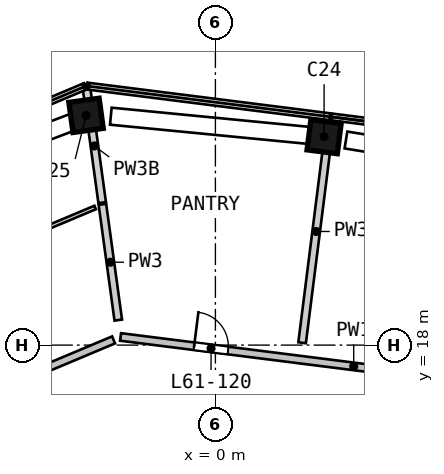
"""IFC4 building model, lengths in metres.
Left out: names, types, materials, properties, quantities, classifications, styles, units other than length and angle.
Written with IfcOpenShell. Run it as: python <this file> out.ifc"""

import sys

from ifc_helpers import new_model, si_unit, direction, frame, frame_2d, origin, origin_2d, place, context, subcontext, project, spatial, rectangle, extrude, element, fill, save


model = new_model("IFC4")
c1 = context("Model", 3, precision=1e-05, world=origin(), true_north=direction((0.0, 1.0)))
c2 = subcontext(c1, "Body", "Model", "MODEL_VIEW")
j1 = project(units=[si_unit("LENGTHUNIT", "METRE"), si_unit("PLANEANGLEUNIT", "RADIAN")], contexts=[c1])
p1 = place(None, origin())
s1 = spatial("IfcSite", under=j1, at=p1, CompositionType="ELEMENT")
p2 = place(p1, origin())
s2 = spatial("IfcBuilding", under=s1, at=p2, CompositionType="ELEMENT")
p3 = place(p2, frame((0.0, 0.0, 248.0)))
s3 = spatial("IfcBuildingStorey", under=s2, at=p3, CompositionType="ELEMENT", Elevation=248.0)
p4 = place(p3, frame((2.965, 23.472, 0.0), z_axis=(-0.087123468, 0.01027372, 0.996144544), x_axis=(-0.988270066, 0.125007093, -0.08772402)))
e1 = element("IfcColumn", 1, at=p4, inside=s3, PredefinedType="COLUMN", context=c2, shape_type="SweptSolid", body=[
    extrude(rectangle(XDim=0.8, YDim=0.8, at=origin_2d()), origin(), (0.0, 0.0, 1.0), 4.206),
])
p5 = place(p3, frame((-3.296, 24.061, 0.0), z_axis=(-0.089136206, -0.01299903, 0.995934617), x_axis=(0.986689244, 0.13539081, 0.090075878)))
e2 = element("IfcColumn", 2, at=p5, inside=s3, PredefinedType="COLUMN", context=c2, shape_type="SweptSolid", body=[
    extrude(rectangle(XDim=0.8, YDim=0.8, at=origin_2d()), origin(), (0.0, 0.0, 1.0), 4.207),
])
p6 = place(p3, frame((-11.268, 14.527, 0.0), z_axis=(0.0, 0.0, 1.0), x_axis=(0.921862121, 0.387518038, 0.0)))
e3 = element("IfcWall", 3, at=p6, inside=s3, PredefinedType="SOLIDWALL", context=c2, shape_type="SweptSolid", body=[
    extrude(rectangle(XDim=9.317, YDim=0.2, at=frame_2d((4.658, 0.0))), origin(), (0.0, 0.0, 1.0), 4.19),
])
p7 = place(p6, frame((5.15, 0.0, 0.0)))
e4 = element("IfcOpeningElement", 4, at=p7, cuts=e3, PredefinedType="OPENING", context=c2, shape_type="SweptSolid", body=[
    extrude(rectangle(XDim=1.0, YDim=2.1, at=frame_2d((0.5, 1.05))), frame((0.0, 0.11, 0.0), z_axis=(0.0, -1.0, 0.0), x_axis=(1.0, 0.0, 0.0)), (0.0, 0.0, 1.0), 0.22),
])
p8 = place(p3, frame((-2.495, 18.215, 0.0), z_axis=(0.0, 0.0, 1.0), x_axis=(0.992116583, -0.125318334, 0.0)))
e5 = element("IfcWall", 5, at=p8, inside=s3, PredefinedType="SOLIDWALL", context=c2, shape_type="SweptSolid", body=[
    extrude(rectangle(XDim=9.316, YDim=0.2, at=frame_2d((4.658, 0.0))), origin(), (0.0, 0.0, 1.0), 4.19),
])
p9 = place(p8, frame((1.95, 0.0, 0.0)))
e6 = element("IfcOpeningElement", 6, at=p9, cuts=e5, PredefinedType="OPENING", context=c2, shape_type="SweptSolid", body=[
    extrude(rectangle(XDim=0.9, YDim=2.1, at=frame_2d((0.45, 1.05))), frame((0.0, 0.11, 0.0), z_axis=(0.0, -1.0, 0.0), x_axis=(1.0, 0.0, 0.0)), (0.0, 0.0, 1.0), 0.22),
])
p10 = place(p3, frame((-6.578, 20.187, 0.0), z_axis=(0.0, 0.0, 1.0), x_axis=(0.921857328, 0.387529441, 0.0)))
e7 = element("IfcWall", 7, at=p10, inside=s3, PredefinedType="PARTITIONING", context=c2, shape_type="SweptSolid", body=[
    extrude(rectangle(XDim=3.704, YDim=0.1, at=frame_2d((1.852, 0.0))), origin(), (0.0, 0.0, 1.0), 4.19),
])
p11 = place(p3, frame((-2.979, 21.75, 0.0), z_axis=(0.0, 0.0, 1.0), x_axis=(-0.135710101, 0.99074859, 0.0)))
e8 = element("IfcWall", 8, at=p11, inside=s3, PredefinedType="SOLIDWALL", context=c2, shape_type="SweptSolid", body=[
    extrude(rectangle(XDim=3.011, YDim=0.2, at=frame_2d((1.506, 0.0))), origin(), (0.0, 0.0, 1.0), 3.69),
])
p12 = place(p3, frame((-2.556, 18.658, 0.0), z_axis=(0.0, 0.0, 1.0), x_axis=(-0.135694266, 0.990750759, 0.0)))
e9 = element("IfcWall", 9, at=p12, inside=s3, PredefinedType="SOLIDWALL", context=c2, shape_type="SweptSolid", body=[
    extrude(rectangle(XDim=3.075, YDim=0.2, at=frame_2d((1.537, 0.0))), origin(), (0.0, 0.0, 1.0), 4.19),
])
p13 = place(p3, frame((3.021, 23.918, 0.0), z_axis=(0.0, 0.0, 1.0), x_axis=(-0.125322535, -0.992116053, 0.0)))
e10 = element("IfcWall", 10, at=p13, inside=s3, PredefinedType="SOLIDWALL", context=c2, shape_type="SweptSolid", body=[
    extrude(rectangle(XDim=5.903, YDim=0.2, at=frame_2d((2.951, 0.0))), origin(), (0.0, 0.0, 1.0), 4.19),
])
p14 = place(p9, origin())
e11 = element("IfcDoor", 11, at=p14, inside=s3, OperationType="SINGLE_SWING_LEFT", PredefinedType="DOOR", context=c2, shape_type="SweptSolid", body=[
    extrude(rectangle(XDim=0.9, YDim=2.1, at=frame_2d((0.45, 1.05))), frame((0.0, 0.025, 0.0), z_axis=(0.0, -1.0, 0.0), x_axis=(1.0, 0.0, 0.0)), (0.0, 0.0, 1.0), 0.05),
])
fill(e6, e11)
save(model, sys.argv[1])
